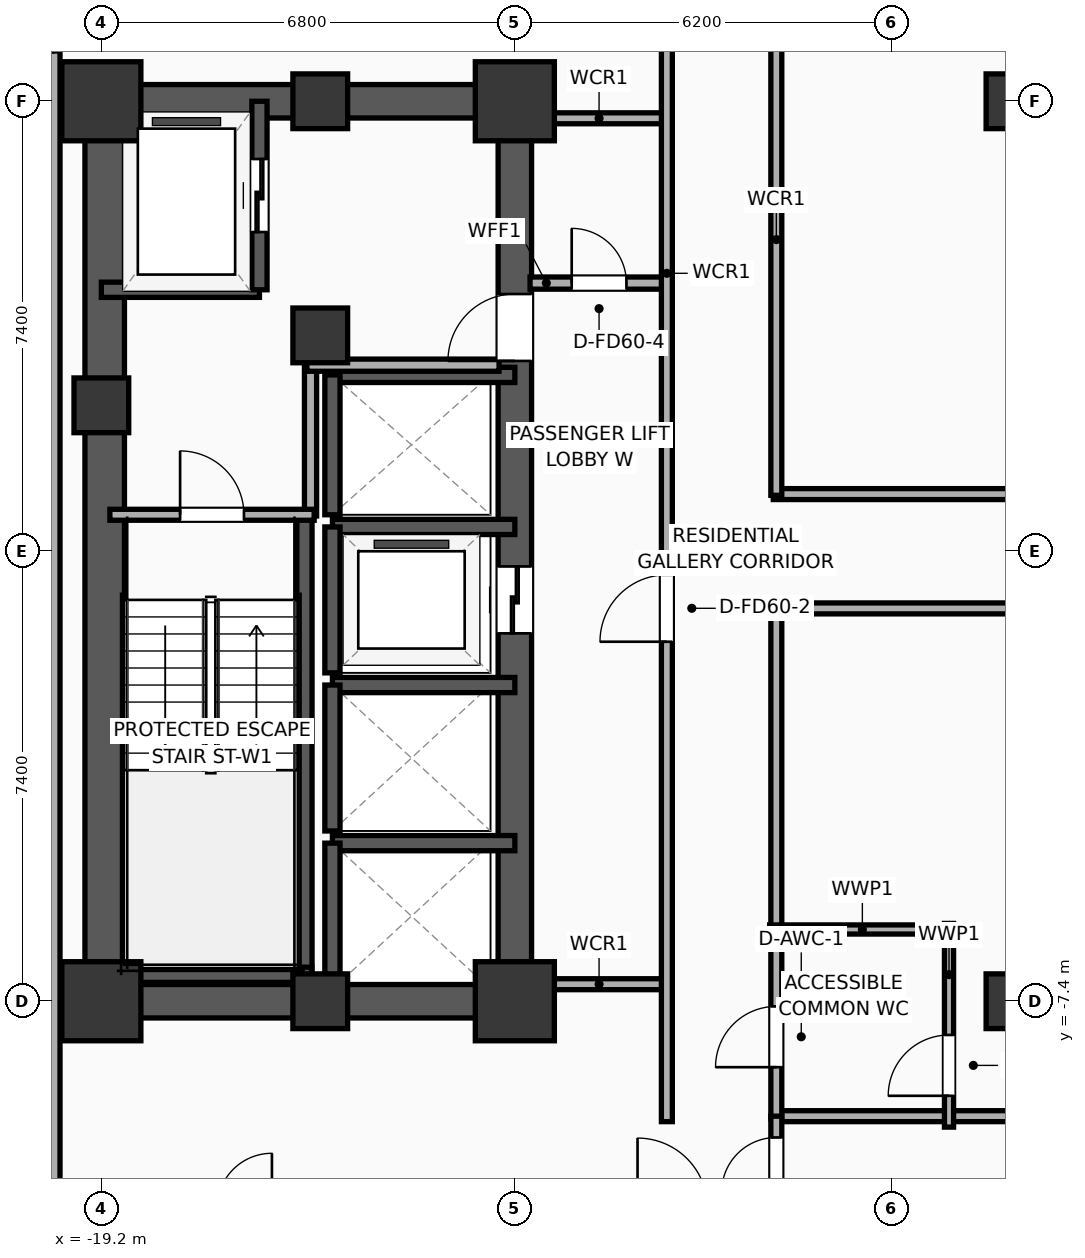
"""IFC4 building model, lengths in metres.
Left out: names, types, materials, properties, quantities, classifications, styles, units other than length and angle.
Written with IfcOpenShell. Run it as: python <this file> out.ifc"""

import sys

from ifc_helpers import new_model, si_unit, direction, frame, frame_2d, origin, origin_2d, place, context, subcontext, project, spatial, rectangle, extrude, element, fill, save


model = new_model("IFC4")
c1 = context("Model", 3, precision=1e-05, world=origin(), true_north=direction((0.0, 1.0)))
c2 = subcontext(c1, "Body", "Model", "MODEL_VIEW")
j1 = project(units=[si_unit("LENGTHUNIT", "METRE"), si_unit("PLANEANGLEUNIT", "RADIAN")], contexts=[c1])
p1 = place(None, origin())
s1 = spatial("IfcSite", under=j1, at=p1, CompositionType="ELEMENT")
p2 = place(p1, origin())
s2 = spatial("IfcBuilding", under=s1, at=p2, CompositionType="ELEMENT")
p3 = place(p2, frame((0.0, 0.0, 140.4)))
s3 = spatial("IfcBuildingStorey", under=s2, at=p3, CompositionType="ELEMENT", Elevation=140.4)
p4 = place(p3, frame((-19.2, -7.4, 0.0), z_axis=(0.0, 0.0, 1.0), x_axis=(1.0, 0.0, 0.0)))
e1 = element("IfcColumn", 1, at=p4, inside=s3, PredefinedType="COLUMN", context=c2, shape_type="SweptSolid", body=[
    extrude(rectangle(XDim=1.3, YDim=1.3, at=origin_2d()), origin(), (0.0, 0.0, 1.0), 3.9),
])
p5 = place(p3, frame((-19.2, 2.4, 0.0), z_axis=(0.0, 0.0, 1.0), x_axis=(1.0, 0.0, 0.0)))
e2 = element("IfcColumn", 2, at=p5, inside=s3, PredefinedType="COLUMN", context=c2, shape_type="SweptSolid", body=[
    extrude(rectangle(XDim=0.9, YDim=0.9, at=origin_2d()), origin(), (0.0, 0.0, 1.0), 3.9),
])
p6 = place(p3, frame((-19.2, 7.4, 0.0), z_axis=(0.0, 0.0, 1.0), x_axis=(1.0, 0.0, 0.0)))
e3 = element("IfcColumn", 3, at=p6, inside=s3, PredefinedType="COLUMN", context=c2, shape_type="SweptSolid", body=[
    extrude(rectangle(XDim=1.3, YDim=1.3, at=origin_2d()), origin(), (0.0, 0.0, 1.0), 3.9),
])
for number, where, z_axis, x_axis in (
    (4, (-15.6, -7.4, 0.0), (0.0, 0.0, 1.0), (1.0, 0.0, 0.0)),
    (5, (-15.6, 7.4, 0.0), (0.0, 0.0, 1.0), (1.0, 0.0, 0.0)),
):
    element("IfcColumn", number, at=place(p3, frame(where, z_axis=z_axis, x_axis=x_axis)), inside=s3, PredefinedType="COLUMN", context=c2, shape_type="SweptSolid", body=[
        extrude(rectangle(XDim=0.9, YDim=0.9, at=origin_2d()), origin(), (0.0, 0.0, 1.0), 3.9),
    ])
p7 = place(p3, frame((-12.4, -7.4, 0.0), z_axis=(0.0, 0.0, 1.0), x_axis=(1.0, 0.0, 0.0)))
e6 = element("IfcColumn", 6, at=p7, inside=s3, PredefinedType="COLUMN", context=c2, shape_type="SweptSolid", body=[
    extrude(rectangle(XDim=1.3, YDim=1.3, at=origin_2d()), origin(), (0.0, 0.0, 1.0), 3.9),
])
p8 = place(p3, frame((-15.6, 3.55, 0.0), z_axis=(0.0, 0.0, 1.0), x_axis=(1.0, 0.0, 0.0)))
e7 = element("IfcColumn", 7, at=p8, inside=s3, PredefinedType="COLUMN", context=c2, shape_type="SweptSolid", body=[
    extrude(rectangle(XDim=0.9, YDim=0.9, at=origin_2d()), origin(), (0.0, 0.0, 1.0), 3.9),
])
p9 = place(p3, frame((-12.4, 7.4, 0.0), z_axis=(0.0, 0.0, 1.0), x_axis=(1.0, 0.0, 0.0)))
e8 = element("IfcColumn", 8, at=p9, inside=s3, PredefinedType="COLUMN", context=c2, shape_type="SweptSolid", body=[
    extrude(rectangle(XDim=1.3, YDim=1.3, at=origin_2d()), origin(), (0.0, 0.0, 1.0), 3.9),
])
for number, where, z_axis, x_axis in (
    (9, (-19.475, -7.4, 0.0), (0.0, 0.0, 1.0), (1.0, 0.0, 0.0)),
    (10, (-19.475, 7.4, 0.0), (0.0, 0.0, 1.0), (1.0, 0.0, 0.0)),
):
    element("IfcWall", number, at=place(p3, frame(where, z_axis=z_axis, x_axis=x_axis)), inside=s3, PredefinedType="SHEAR", context=c2, shape_type="SweptSolid", body=[
        extrude(rectangle(XDim=7.35, YDim=0.55, at=frame_2d((3.675, 0.0))), origin(), (0.0, 0.0, 1.0), 3.65),
    ])
p10 = place(p3, frame((-19.145, -7.4, 0.0), z_axis=(0.0, 0.0, 1.0), x_axis=(0.0, 1.0, 0.0)))
e11 = element("IfcWall", 11, at=p10, inside=s3, PredefinedType="SHEAR", context=c2, shape_type="SweptSolid", body=[
    extrude(rectangle(XDim=14.8, YDim=0.65, at=frame_2d((7.4, 0.0))), origin(), (0.0, 0.0, 1.0), 3.65),
])
p11 = place(p3, frame((-12.4, -7.4, 0.0), z_axis=(0.0, 0.0, 1.0), x_axis=(0.0, 1.0, 0.0)))
e12 = element("IfcWall", 12, at=p11, inside=s3, PredefinedType="SHEAR", context=c2, shape_type="SweptSolid", body=[
    extrude(rectangle(XDim=14.8, YDim=0.55, at=frame_2d((7.4, 0.0))), origin(), (0.0, 0.0, 1.0), 3.65),
])
p12 = place(p11, frame((6.05, 0.0, 0.0)))
e13 = element("IfcOpeningElement", 13, at=p12, cuts=e12, PredefinedType="OPENING", context=c2, shape_type="SweptSolid", body=[
    extrude(rectangle(XDim=1.1, YDim=2.05, at=frame_2d((0.55, 1.025))), frame((0.0, 0.285, 0.0), z_axis=(0.0, -1.0, 0.0), x_axis=(1.0, 0.0, 0.0)), (0.0, 0.0, 1.0), 0.57),
])
p13 = place(p11, frame((10.53, 0.0, 0.0)))
e14 = element("IfcOpeningElement", 14, at=p13, cuts=e12, PredefinedType="OPENING", context=c2, shape_type="SweptSolid", body=[
    extrude(rectangle(XDim=1.1, YDim=2.05, at=frame_2d((0.55, 1.025))), frame((0.0, 0.285, 0.0), z_axis=(0.0, -1.0, 0.0), x_axis=(1.0, 0.0, 0.0)), (0.0, 0.0, 1.0), 0.57),
])
p14 = place(p3, frame((-15.86, -7.085, 0.0), z_axis=(0.0, 0.0, 1.0), x_axis=(0.0, 1.0, 0.0)))
e15 = element("IfcWall", 15, at=p14, inside=s3, PredefinedType="SOLIDWALL", context=c2, shape_type="SweptSolid", body=[
    extrude(rectangle(XDim=7.685, YDim=0.25, at=frame_2d((3.843, 0.0))), origin(), (0.0, 0.0, 1.0), 3.65),
])
p15 = place(p3, frame((-19.2, -6.965, 0.0), z_axis=(0.0, 0.0, 1.0), x_axis=(1.0, 0.0, 0.0)))
e16 = element("IfcWall", 16, at=p15, inside=s3, PredefinedType="SOLIDWALL", context=c2, shape_type="SweptSolid", body=[
    extrude(rectangle(XDim=3.46, YDim=0.25, at=frame_2d((1.73, 0.0))), origin(), (0.0, 0.0, 1.0), 3.65),
])
for number, where, z_axis, x_axis in (
    (17, (-4.2, -7.4, 0.0), (0.0, 0.0, 1.0), (1.0, 0.0, 0.0)),
    (18, (-4.2, 7.4, 0.0), (0.0, 0.0, 1.0), (1.0, 0.0, 0.0)),
):
    element("IfcColumn", number, at=place(p3, frame(where, z_axis=z_axis, x_axis=x_axis)), inside=s3, PredefinedType="COLUMN", context=c2, shape_type="SweptSolid", body=[
        extrude(rectangle(XDim=0.9, YDim=0.9, at=origin_2d()), origin(), (0.0, 0.0, 1.0), 3.9),
    ])
p16 = place(p3, frame((-19.2, 4.3, 0.0), z_axis=(0.0, 0.0, 1.0), x_axis=(1.0, 0.0, 0.0)))
e19 = element("IfcWall", 19, at=p16, inside=s3, PredefinedType="SOLIDWALL", context=c2, shape_type="SweptSolid", body=[
    extrude(rectangle(XDim=2.6, YDim=0.25, at=frame_2d((1.3, 0.0))), origin(), (0.0, 0.0, 1.0), 3.65),
])
p17 = place(p3, frame((-16.6, 4.3, 0.0), z_axis=(0.0, 0.0, 1.0), x_axis=(0.0, 1.0, 0.0)))
e20 = element("IfcWall", 20, at=p17, inside=s3, PredefinedType="SOLIDWALL", context=c2, shape_type="SweptSolid", body=[
    extrude(rectangle(XDim=3.1, YDim=0.25, at=frame_2d((1.55, 0.0))), origin(), (0.0, 0.0, 1.0), 3.65),
])
p18 = place(p17, frame((0.95, 0.0, 0.0)))
e21 = element("IfcOpeningElement", 21, at=p18, cuts=e20, PredefinedType="OPENING", context=c2, shape_type="SweptSolid", body=[
    extrude(rectangle(XDim=1.2, YDim=2.05, at=frame_2d((0.6, 1.025))), frame((0.0, 0.135, 0.0), z_axis=(0.0, -1.0, 0.0), x_axis=(1.0, 0.0, 0.0)), (0.0, 0.0, 1.0), 0.27),
])
p19 = place(p3, frame((-12.4, -4.8, 0.0), z_axis=(0.0, 0.0, 1.0), x_axis=(-1.0, 0.0, 0.0)))
e22 = element("IfcWall", 22, at=p19, inside=s3, PredefinedType="SOLIDWALL", context=c2, shape_type="SweptSolid", body=[
    extrude(rectangle(XDim=3.0, YDim=0.25, at=frame_2d((1.5, 0.0))), origin(), (0.0, 0.0, 1.0), 3.65),
])
p20 = place(p3, frame((-15.4, -4.8, 0.0), z_axis=(0.0, 0.0, 1.0), x_axis=(0.0, -1.0, 0.0)))
e23 = element("IfcWall", 23, at=p20, inside=s3, PredefinedType="SOLIDWALL", context=c2, shape_type="SweptSolid", body=[
    extrude(rectangle(XDim=2.6, YDim=0.25, at=frame_2d((1.3, 0.0))), origin(), (0.0, 0.0, 1.0), 3.65),
])
p21 = place(p3, frame((-12.4, -2.2, 0.0), z_axis=(0.0, 0.0, 1.0), x_axis=(-1.0, 0.0, 0.0)))
e24 = element("IfcWall", 24, at=p21, inside=s3, PredefinedType="SOLIDWALL", context=c2, shape_type="SweptSolid", body=[
    extrude(rectangle(XDim=3.0, YDim=0.25, at=frame_2d((1.5, 0.0))), origin(), (0.0, 0.0, 1.0), 3.65),
])
p22 = place(p3, frame((-15.4, -2.2, 0.0), z_axis=(0.0, 0.0, 1.0), x_axis=(0.0, -1.0, 0.0)))
e25 = element("IfcWall", 25, at=p22, inside=s3, PredefinedType="SOLIDWALL", context=c2, shape_type="SweptSolid", body=[
    extrude(rectangle(XDim=2.4, YDim=0.25, at=frame_2d((1.2, 0.0))), origin(), (0.0, 0.0, 1.0), 3.65),
])
p23 = place(p3, frame((-12.4, 0.4, 0.0), z_axis=(0.0, 0.0, 1.0), x_axis=(-1.0, 0.0, 0.0)))
e26 = element("IfcWall", 26, at=p23, inside=s3, PredefinedType="SOLIDWALL", context=c2, shape_type="SweptSolid", body=[
    extrude(rectangle(XDim=3.0, YDim=0.25, at=frame_2d((1.5, 0.0))), origin(), (0.0, 0.0, 1.0), 3.65),
])
p24 = place(p3, frame((-15.4, 0.4, 0.0), z_axis=(0.0, 0.0, 1.0), x_axis=(0.0, -1.0, 0.0)))
e27 = element("IfcWall", 27, at=p24, inside=s3, PredefinedType="SOLIDWALL", context=c2, shape_type="SweptSolid", body=[
    extrude(rectangle(XDim=2.4, YDim=0.25, at=frame_2d((1.2, 0.0))), origin(), (0.0, 0.0, 1.0), 3.65),
])
p25 = place(p3, frame((-12.4, 2.9, 0.0), z_axis=(0.0, 0.0, 1.0), x_axis=(-1.0, 0.0, 0.0)))
e28 = element("IfcWall", 28, at=p25, inside=s3, PredefinedType="SOLIDWALL", context=c2, shape_type="SweptSolid", body=[
    extrude(rectangle(XDim=3.0, YDim=0.25, at=frame_2d((1.5, 0.0))), origin(), (0.0, 0.0, 1.0), 3.65),
])
p26 = place(p3, frame((-15.4, 2.9, 0.0), z_axis=(0.0, 0.0, 1.0), x_axis=(0.0, -1.0, 0.0)))
e29 = element("IfcWall", 29, at=p26, inside=s3, PredefinedType="SOLIDWALL", context=c2, shape_type="SweptSolid", body=[
    extrude(rectangle(XDim=2.3, YDim=0.25, at=frame_2d((1.15, 0.0))), origin(), (0.0, 0.0, 1.0), 3.65),
])
p27 = place(p3, frame((-15.76, 0.58, 0.0), z_axis=(0.0, 0.0, 1.0), x_axis=(0.0, 1.0, 0.0)))
e30 = element("IfcWall", 30, at=p27, inside=s3, PredefinedType="PARTITIONING", context=c2, shape_type="SweptSolid", body=[
    extrude(rectangle(XDim=2.52, YDim=0.2, at=frame_2d((1.26, 0.0))), origin(), (0.0, 0.0, 1.0), 3.65),
])
p28 = place(p3, frame((-15.82, 3.06, 0.0), z_axis=(0.0, 0.0, 1.0), x_axis=(1.0, 0.0, 0.0)))
e31 = element("IfcWall", 31, at=p28, inside=s3, PredefinedType="PARTITIONING", context=c2, shape_type="SweptSolid", body=[
    extrude(rectangle(XDim=3.16, YDim=0.2, at=frame_2d((1.58, 0.0))), origin(), (0.0, 0.0, 1.0), 3.65),
])
p29 = place(p3, frame((-19.06, 0.6, 0.0), z_axis=(0.0, 0.0, 1.0), x_axis=(1.0, 0.0, 0.0)))
e32 = element("IfcWall", 32, at=p29, inside=s3, PredefinedType="PARTITIONING", context=c2, shape_type="SweptSolid", body=[
    extrude(rectangle(XDim=3.36, YDim=0.18, at=frame_2d((1.68, 0.0))), origin(), (0.0, 0.0, 1.0), 3.65),
])
p30 = place(p29, frame((1.155, 0.0, 0.0)))
e33 = element("IfcOpeningElement", 33, at=p30, cuts=e32, PredefinedType="OPENING", context=c2, shape_type="SweptSolid", body=[
    extrude(rectangle(XDim=1.05, YDim=2.05, at=frame_2d((0.525, 1.025))), frame((0.0, 0.1, 0.0), z_axis=(0.0, -1.0, 0.0), x_axis=(1.0, 0.0, 0.0)), (0.0, 0.0, 1.0), 0.2),
])
p31 = place(p3, frame((-12.15, 4.41, 0.0), z_axis=(0.0, 0.0, 1.0), x_axis=(1.0, 0.0, 0.0)))
e34 = element("IfcWall", 34, at=p31, inside=s3, PredefinedType="PARTITIONING", context=c2, shape_type="SweptSolid", body=[
    extrude(rectangle(XDim=2.27, YDim=0.2, at=frame_2d((1.135, 0.0))), origin(), (0.0, 0.0, 1.0), 3.65),
])
p32 = place(p31, frame((0.685, 0.0, 0.0)))
e35 = element("IfcOpeningElement", 35, at=p32, cuts=e34, PredefinedType="OPENING", context=c2, shape_type="SweptSolid", body=[
    extrude(rectangle(XDim=0.9, YDim=2.05, at=frame_2d((0.45, 1.025))), frame((0.0, 0.11, 0.0), z_axis=(0.0, -1.0, 0.0), x_axis=(1.0, 0.0, 0.0)), (0.0, 0.0, 1.0), 0.22),
])
for number, where, z_axis, x_axis in (
    (36, (-12.15, 7.12, 0.0), (0.0, 0.0, 1.0), (1.0, 0.0, 0.0)),
    (37, (-12.15, -7.12, 0.0), (0.0, 0.0, 1.0), (1.0, 0.0, 0.0)),
):
    element("IfcWall", number, at=place(p3, frame(where, z_axis=z_axis, x_axis=x_axis)), inside=s3, PredefinedType="PARTITIONING", context=c2, shape_type="SweptSolid", body=[
        extrude(rectangle(XDim=2.27, YDim=0.18, at=frame_2d((1.135, 0.0))), origin(), (0.0, 0.0, 1.0), 3.65),
    ])
p33 = place(p3, frame((-9.9, -9.38, 0.0), z_axis=(0.0, 0.0, 1.0), x_axis=(0.0, 1.0, 0.0)))
e38 = element("IfcWall", 38, at=p33, inside=s3, PredefinedType="PARTITIONING", context=c2, shape_type="SweptSolid", body=[
    extrude(rectangle(XDim=18.76, YDim=0.18, at=frame_2d((9.38, 0.0))), origin(), (0.0, 0.0, 1.0), 3.65),
])
p34 = place(p33, frame((7.892, 0.0, 0.0)))
e39 = element("IfcOpeningElement", 39, at=p34, cuts=e38, PredefinedType="OPENING", context=c2, shape_type="SweptSolid", body=[
    extrude(rectangle(XDim=1.1, YDim=2.05, at=frame_2d((0.55, 1.025))), frame((0.0, 0.1, 0.0), z_axis=(0.0, -1.0, 0.0), x_axis=(1.0, 0.0, 0.0)), (0.0, 0.0, 1.0), 0.2),
])
p35 = place(p3, frame((-8.15, -9.29, 0.0), z_axis=(0.0, 0.0, 1.0), x_axis=(1.0, 0.0, 0.0)))
e40 = element("IfcWall", 40, at=p35, inside=s3, PredefinedType="PARTITIONING", context=c2, shape_type="SweptSolid", body=[
    extrude(rectangle(XDim=16.3, YDim=0.18, at=frame_2d((8.15, 0.0))), origin(), (0.0, 0.0, 1.0), 3.65),
])
p36 = place(p3, frame((-8.15, 0.94, 0.0), z_axis=(0.0, 0.0, 1.0), x_axis=(1.0, 0.0, 0.0)))
e41 = element("IfcWall", 41, at=p36, inside=s3, PredefinedType="PARTITIONING", context=c2, shape_type="SweptSolid", body=[
    extrude(rectangle(XDim=16.3, YDim=0.18, at=frame_2d((8.15, 0.0))), origin(), (0.0, 0.0, 1.0), 3.65),
])
p37 = place(p36, frame((7.675, 0.0, 0.0)))
e42 = element("IfcOpeningElement", 42, at=p37, cuts=e41, PredefinedType="OPENING", context=c2, shape_type="SweptSolid", body=[
    extrude(rectangle(XDim=0.95, YDim=2.05, at=frame_2d((0.475, 1.025))), frame((0.0, 0.1, 0.0), z_axis=(0.0, -1.0, 0.0), x_axis=(1.0, 0.0, 0.0)), (0.0, 0.0, 1.0), 0.2),
])
p38 = place(p3, frame((-8.15, -0.94, 0.0), z_axis=(0.0, 0.0, 1.0), x_axis=(1.0, 0.0, 0.0)))
e43 = element("IfcWall", 43, at=p38, inside=s3, PredefinedType="PARTITIONING", context=c2, shape_type="SweptSolid", body=[
    extrude(rectangle(XDim=16.3, YDim=0.18, at=frame_2d((8.15, 0.0))), origin(), (0.0, 0.0, 1.0), 3.65),
])
p39 = place(p38, frame((9.305, 0.0, 0.0)))
e44 = element("IfcOpeningElement", 44, at=p39, cuts=e43, PredefinedType="OPENING", context=c2, shape_type="SweptSolid", body=[
    extrude(rectangle(XDim=0.95, YDim=2.05, at=frame_2d((0.475, 1.025))), frame((0.0, 0.1, 0.0), z_axis=(0.0, -1.0, 0.0), x_axis=(1.0, 0.0, 0.0)), (0.0, 0.0, 1.0), 0.2),
])
p40 = place(p3, frame((-8.1, 0.92, 0.0), z_axis=(0.0, 0.0, 1.0), x_axis=(0.0, 1.0, 0.0)))
e45 = element("IfcWall", 45, at=p40, inside=s3, PredefinedType="PARTITIONING", context=c2, shape_type="SweptSolid", body=[
    extrude(rectangle(XDim=8.41, YDim=0.18, at=frame_2d((4.205, 0.0))), origin(), (0.0, 0.0, 1.0), 3.65),
])
p41 = place(p3, frame((-8.1, -9.33, 0.0), z_axis=(0.0, 0.0, 1.0), x_axis=(0.0, 1.0, 0.0)))
e46 = element("IfcWall", 46, at=p41, inside=s3, PredefinedType="PARTITIONING", context=c2, shape_type="SweptSolid", body=[
    extrude(rectangle(XDim=8.41, YDim=0.18, at=frame_2d((4.205, 0.0))), origin(), (0.0, 0.0, 1.0), 3.65),
])
p42 = place(p41, frame((0.846, 0.0, 0.0)))
e47 = element("IfcOpeningElement", 47, at=p42, cuts=e46, PredefinedType="OPENING", context=c2, shape_type="SweptSolid", body=[
    extrude(rectangle(XDim=1.0, YDim=2.05, at=frame_2d((0.5, 1.025))), frame((0.0, 0.1, 0.0), z_axis=(0.0, -1.0, 0.0), x_axis=(1.0, 0.0, 0.0)), (0.0, 0.0, 1.0), 0.2),
])
p43 = place(p3, frame((-5.26, -9.47, 0.0), z_axis=(0.0, 0.0, 1.0), x_axis=(0.0, 1.0, 0.0)))
e48 = element("IfcWall", 48, at=p43, inside=s3, PredefinedType="PLUMBINGWALL", context=c2, shape_type="SweptSolid", body=[
    extrude(rectangle(XDim=3.35, YDim=0.15, at=frame_2d((1.675, 0.0))), origin(), (0.0, 0.0, 1.0), 3.65),
])
p44 = place(p43, frame((0.515, 0.0, 0.0)))
e49 = element("IfcOpeningElement", 49, at=p44, cuts=e48, PredefinedType="OPENING", context=c2, shape_type="SweptSolid", body=[
    extrude(rectangle(XDim=1.0, YDim=2.05, at=frame_2d((0.5, 1.025))), frame((0.0, 0.085, 0.0), z_axis=(0.0, -1.0, 0.0), x_axis=(1.0, 0.0, 0.0)), (0.0, 0.0, 1.0), 0.17),
])
p45 = place(p3, frame((-8.21, -6.22, 0.0), z_axis=(0.0, 0.0, 1.0), x_axis=(1.0, 0.0, 0.0)))
e50 = element("IfcWall", 50, at=p45, inside=s3, PredefinedType="PLUMBINGWALL", context=c2, shape_type="SweptSolid", body=[
    extrude(rectangle(XDim=3.05, YDim=0.15, at=frame_2d((1.525, 0.0))), origin(), (0.0, 0.0, 1.0), 3.65),
])
p46 = place(p3, frame((-8.1, -21.456, 0.0), z_axis=(0.0, 0.0, 1.0), x_axis=(0.0, 1.0, 0.0)))
e51 = element("IfcWall", 51, at=p46, inside=s3, PredefinedType="PARTITIONING", context=c2, shape_type="SweptSolid", body=[
    extrude(rectangle(XDim=12.166, YDim=0.18, at=frame_2d((6.083, 0.0))), origin(), (0.0, 0.0, 1.0), 3.65),
])
p47 = place(p46, frame((10.916, 0.0, 0.0)))
e52 = element("IfcOpeningElement", 52, at=p47, cuts=e51, PredefinedType="OPENING", context=c2, shape_type="SweptSolid", body=[
    extrude(rectangle(XDim=0.9, YDim=2.05, at=frame_2d((0.45, 1.025))), frame((0.0, 0.1, 0.0), z_axis=(0.0, -1.0, 0.0), x_axis=(1.0, 0.0, 0.0)), (0.0, 0.0, 1.0), 0.2),
])
p48 = place(p3, frame((-19.97, -10.85, 0.0), z_axis=(0.0, 0.0, 1.0), x_axis=(0.0, 1.0, 0.0)))
e53 = element("IfcWall", 53, at=p48, inside=s3, PredefinedType="PARTITIONING", context=c2, shape_type="SweptSolid", body=[
    extrude(rectangle(XDim=21.7, YDim=0.18, at=frame_2d((10.85, 0.0))), origin(), (0.0, 0.0, 1.0), 2.54),
])
p49 = place(p48, frame((19.055, 0.0, 0.0)))
e54 = element("IfcOpeningElement", 54, at=p49, cuts=e53, PredefinedType="OPENING", context=c2, shape_type="SweptSolid", body=[
    extrude(rectangle(XDim=0.95, YDim=2.05, at=frame_2d((0.475, 1.025))), frame((0.0, 0.1, 0.0), z_axis=(0.0, -1.0, 0.0), x_axis=(1.0, 0.0, 0.0)), (0.0, 0.0, 1.0), 0.2),
])
p50 = place(p18, origin())
e55 = element("IfcDoor", 55, at=p50, inside=s3, OperationType="SLIDING_TO_LEFT", PredefinedType="DOOR", context=c2, shape_type="SweptSolid", body=[
    extrude(rectangle(XDim=1.2, YDim=2.05, at=frame_2d((0.6, 1.025))), frame((0.0, 0.025, 0.0), z_axis=(0.0, -1.0, 0.0), x_axis=(1.0, 0.0, 0.0)), (0.0, 0.0, 1.0), 0.05),
])
fill(e21, e55)
p51 = place(p12, origin())
e56 = element("IfcDoor", 56, at=p51, inside=s3, OperationType="SLIDING_TO_LEFT", PredefinedType="DOOR", context=c2, shape_type="SweptSolid", body=[
    extrude(rectangle(XDim=1.1, YDim=2.05, at=frame_2d((0.55, 1.025))), frame((0.0, 0.025, 0.0), z_axis=(0.0, -1.0, 0.0), x_axis=(1.0, 0.0, 0.0)), (0.0, 0.0, 1.0), 0.05),
])
fill(e13, e56)
p52 = place(p30, origin())
e57 = element("IfcDoor", 57, at=p52, inside=s3, OperationType="SINGLE_SWING_LEFT", PredefinedType="DOOR", context=c2, shape_type="SweptSolid", body=[
    extrude(rectangle(XDim=1.05, YDim=2.05, at=frame_2d((0.525, 1.025))), frame((0.0, 0.025, 0.0), z_axis=(0.0, -1.0, 0.0), x_axis=(1.0, 0.0, 0.0)), (0.0, 0.0, 1.0), 0.05),
])
fill(e33, e57)
p53 = place(p32, origin())
e58 = element("IfcDoor", 58, at=p53, inside=s3, OperationType="SINGLE_SWING_LEFT", PredefinedType="DOOR", context=c2, shape_type="SweptSolid", body=[
    extrude(rectangle(XDim=0.9, YDim=2.05, at=frame_2d((0.45, 1.025))), frame((0.0, 0.025, 0.0), z_axis=(0.0, -1.0, 0.0), x_axis=(1.0, 0.0, 0.0)), (0.0, 0.0, 1.0), 0.05),
])
fill(e35, e58)
p54 = place(p34, origin())
e59 = element("IfcDoor", 59, at=p54, inside=s3, OperationType="SINGLE_SWING_LEFT", PredefinedType="DOOR", context=c2, shape_type="SweptSolid", body=[
    extrude(rectangle(XDim=1.1, YDim=2.05, at=frame_2d((0.55, 1.025))), frame((0.0, 0.025, 0.0), z_axis=(0.0, -1.0, 0.0), x_axis=(1.0, 0.0, 0.0)), (0.0, 0.0, 1.0), 0.05),
])
fill(e39, e59)
p55 = place(p42, origin())
e60 = element("IfcDoor", 60, at=p55, inside=s3, OperationType="SINGLE_SWING_LEFT", PredefinedType="DOOR", context=c2, shape_type="SweptSolid", body=[
    extrude(rectangle(XDim=1.0, YDim=2.05, at=frame_2d((0.5, 1.025))), frame((0.0, 0.025, 0.0), z_axis=(0.0, -1.0, 0.0), x_axis=(1.0, 0.0, 0.0)), (0.0, 0.0, 1.0), 0.05),
])
fill(e47, e60)
p56 = place(p44, origin())
e61 = element("IfcDoor", 61, at=p56, inside=s3, OperationType="SINGLE_SWING_LEFT", PredefinedType="DOOR", context=c2, shape_type="SweptSolid", body=[
    extrude(rectangle(XDim=1.0, YDim=2.05, at=frame_2d((0.5, 1.025))), frame((0.0, 0.025, 0.0), z_axis=(0.0, -1.0, 0.0), x_axis=(1.0, 0.0, 0.0)), (0.0, 0.0, 1.0), 0.05),
])
fill(e49, e61)
p57 = place(p47, origin())
e62 = element("IfcDoor", 62, at=p57, inside=s3, OperationType="SINGLE_SWING_LEFT", PredefinedType="DOOR", context=c2, shape_type="SweptSolid", body=[
    extrude(rectangle(XDim=0.9, YDim=2.05, at=frame_2d((0.45, 1.025))), frame((0.0, 0.025, 0.0), z_axis=(0.0, -1.0, 0.0), x_axis=(1.0, 0.0, 0.0)), (0.0, 0.0, 1.0), 0.05),
])
fill(e52, e62)
p58 = place(p13, origin())
e63 = element("IfcDoor", 63, at=p58, inside=s3, OperationType="SINGLE_SWING_LEFT", PredefinedType="DOOR", context=c2, shape_type="SweptSolid", body=[
    extrude(rectangle(XDim=1.1, YDim=2.05, at=frame_2d((0.55, 1.025))), frame((0.0, 0.025, 0.0), z_axis=(0.0, -1.0, 0.0), x_axis=(1.0, 0.0, 0.0)), (0.0, 0.0, 1.0), 0.05),
])
fill(e14, e63)
save(model, sys.argv[1])
